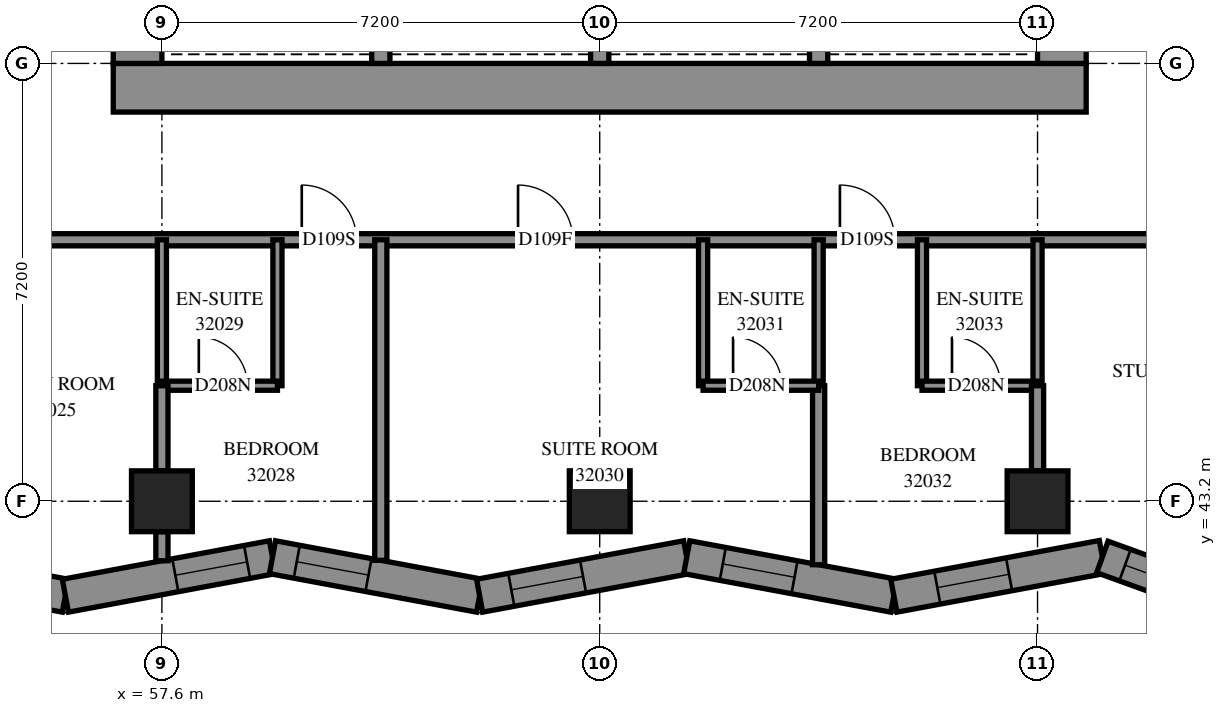
"""IFC4 building model, lengths in metres.
Left out: names, types, materials, properties, quantities, classifications, styles, units other than length and angle.
Written with IfcOpenShell. Run it as: python <this file> out.ifc"""

import sys

from ifc_helpers import new_model, si_unit, direction, frame, frame_2d, origin, origin_2d, place, context, subcontext, project, spatial, polyline, rectangle, outline, extrude, element, fill, save


model = new_model("IFC4")
c1 = context("Model", 3, precision=1e-05, world=origin(), true_north=direction((0.0, 1.0)))
c2 = subcontext(c1, "Body", "Model", "MODEL_VIEW")
j1 = project(units=[si_unit("LENGTHUNIT", "METRE"), si_unit("PLANEANGLEUNIT", "RADIAN")], contexts=[c1])
p1 = place(None, origin())
s1 = spatial("IfcSite", under=j1, at=p1, CompositionType="ELEMENT")
p2 = place(p1, origin())
s2 = spatial("IfcBuilding", under=s1, at=p2, CompositionType="ELEMENT")
p3 = place(p2, frame((0.0, 0.0, 118.6)))
s3 = spatial("IfcBuildingStorey", under=s2, at=p3, CompositionType="ELEMENT", Elevation=118.6)
for number, where, z_axis, x_axis in (
    (1, (57.6, 43.2, 0.0), (0.0, 0.0, 1.0), (1.0, 0.0, 0.0)),
    (2, (64.8, 43.2, 0.0), (0.0, 0.0, 1.0), (1.0, 0.0, 0.0)),
    (3, (72.0, 43.2, 0.0), (0.0, 0.0, 1.0), (1.0, 0.0, 0.0)),
):
    element("IfcColumn", number, at=place(p3, frame(where, z_axis=z_axis, x_axis=x_axis)), inside=s3, PredefinedType="COLUMN", context=c2, shape_type="SweptSolid", body=[
        extrude(rectangle(XDim=1.0, YDim=1.0, at=origin_2d()), origin(), (0.0, 0.0, 1.0), 3.1),
    ])
p4 = place(p3, frame((56.8, 50.0, -0.3), z_axis=(0.0, 0.0, 1.0), x_axis=(1.0, 0.0, 0.0)))
e4 = element("IfcWall", 4, at=p4, inside=s3, PredefinedType="SHEAR", context=c2, shape_type="SweptSolid", body=[
    extrude(rectangle(XDim=16.0, YDim=0.8, at=frame_2d((8.0, 0.0))), origin(), (0.0, 0.0, 1.0), 2.7),
])
p5 = place(p3, frame((57.2, 50.4, -0.3), z_axis=(0.0, 0.0, 1.0), x_axis=(0.0, 1.0, 0.0)))
e5 = element("IfcWall", 5, at=p5, inside=s3, PredefinedType="SHEAR", context=c2, shape_type="SweptSolid", body=[
    extrude(rectangle(XDim=14.4, YDim=0.8, at=frame_2d((7.2, 0.0))), origin(), (0.0, 0.0, 1.0), 2.7),
])
p6 = place(p5, frame((4.55, 0.0, 0.3)))
e6 = element("IfcOpeningElement", 6, at=p6, cuts=e5, PredefinedType="OPENING", context=c2, shape_type="SweptSolid", body=[
    extrude(rectangle(XDim=1.1, YDim=2.1, at=frame_2d((0.55, 1.05))), frame((0.0, 0.41, 0.0), z_axis=(0.0, -1.0, 0.0), x_axis=(1.0, 0.0, 0.0)), (0.0, 0.0, 1.0), 0.82),
])
p7 = place(p5, frame((11.35, 0.0, 0.3)))
e7 = element("IfcOpeningElement", 7, at=p7, cuts=e5, PredefinedType="OPENING", context=c2, shape_type="SweptSolid", body=[
    extrude(rectangle(XDim=1.1, YDim=2.1, at=frame_2d((0.55, 1.05))), frame((0.0, 0.41, 0.0), z_axis=(0.0, -1.0, 0.0), x_axis=(1.0, 0.0, 0.0)), (0.0, 0.0, 1.0), 0.82),
])
p8 = place(p3, frame((72.4, 50.4, -0.3), z_axis=(0.0, 0.0, 1.0), x_axis=(0.0, 1.0, 0.0)))
e8 = element("IfcWall", 8, at=p8, inside=s3, PredefinedType="SHEAR", context=c2, shape_type="SweptSolid", body=[
    extrude(rectangle(XDim=14.4, YDim=0.8, at=frame_2d((7.2, 0.0))), origin(), (0.0, 0.0, 1.0), 2.7),
])
p9 = place(p8, frame((4.55, 0.0, 0.3)))
e9 = element("IfcOpeningElement", 9, at=p9, cuts=e8, PredefinedType="OPENING", context=c2, shape_type="SweptSolid", body=[
    extrude(rectangle(XDim=1.1, YDim=2.1, at=frame_2d((0.55, 1.05))), frame((0.0, 0.41, 0.0), z_axis=(0.0, -1.0, 0.0), x_axis=(1.0, 0.0, 0.0)), (0.0, 0.0, 1.0), 0.82),
])
p10 = place(p8, frame((11.35, 0.0, 0.3)))
e10 = element("IfcOpeningElement", 10, at=p10, cuts=e8, PredefinedType="OPENING", context=c2, shape_type="SweptSolid", body=[
    extrude(rectangle(XDim=1.1, YDim=2.1, at=frame_2d((0.55, 1.05))), frame((0.0, 0.41, 0.0), z_axis=(0.0, -1.0, 0.0), x_axis=(1.0, 0.0, 0.0)), (0.0, 0.0, 1.0), 0.82),
])
for number, where, z_axis, x_axis in (
    (11, (61.2, 50.4, 0.0), (0.0, 0.0, 1.0), (0.0, 1.0, 0.0)),
    (12, (64.8, 50.4, 0.0), (0.0, 0.0, 1.0), (0.0, 1.0, 0.0)),
    (13, (68.4, 50.4, 0.0), (0.0, 0.0, 1.0), (0.0, 1.0, 0.0)),
):
    element("IfcWall", number, at=place(p3, frame(where, z_axis=z_axis, x_axis=x_axis)), inside=s3, PredefinedType="SOLIDWALL", context=c2, shape_type="SweptSolid", body=[
        extrude(rectangle(XDim=3.3, YDim=0.3, at=frame_2d((1.65, 0.0))), origin(), (0.0, 0.0, 1.0), 3.1),
    ])
p11 = place(p3, frame((52.583, 42.284, 0.0), z_axis=(0.0, 0.0, 1.0), x_axis=(0.9831685115, -0.1827010621, 0.0)))
e14 = element("IfcWall", 14, at=p11, inside=s3, PredefinedType="SOLIDWALL", context=c2, shape_type="SweptSolid", body=[
    extrude(outline(polyline([(0.075, -0.275), (3.539, -0.275), (3.437, 0.275), (-0.075, 0.275), (0.075, -0.275)])), origin(), (0.0, 0.0, 1.0), 3.1),
])
p12 = place(p11, frame((1.739, 0.0, 0.5)))
e15 = element("IfcOpeningElement", 15, at=p12, cuts=e14, PredefinedType="OPENING", context=c2, shape_type="SweptSolid", body=[
    extrude(rectangle(XDim=1.2, YDim=2.45, at=frame_2d((0.6, 1.225))), frame((0.0, 0.285, 0.0), z_axis=(0.0, -1.0, 0.0), x_axis=(1.0, 0.0, 0.0)), (0.0, 0.0, 1.0), 0.57),
])
p13 = place(p3, frame((56.012, 41.647, 0.0), z_axis=(0.0, 0.0, 1.0), x_axis=(0.9831660022, 0.1827145649, 0.0)))
e16 = element("IfcWall", 16, at=p13, inside=s3, PredefinedType="SOLIDWALL", context=c2, shape_type="SweptSolid", body=[
    extrude(outline(polyline([(-0.051, -0.275), (3.413, -0.275), (3.516, 0.275), (0.051, 0.275), (-0.051, -0.275)])), origin(), (0.0, 0.0, 1.0), 3.1),
])
p14 = place(p13, frame((1.84, 0.0, 0.5)))
e17 = element("IfcOpeningElement", 17, at=p14, cuts=e16, PredefinedType="OPENING", context=c2, shape_type="SweptSolid", body=[
    extrude(rectangle(XDim=1.2, YDim=2.45, at=frame_2d((0.6, 1.225))), frame((0.0, 0.285, 0.0), z_axis=(0.0, -1.0, 0.0), x_axis=(1.0, 0.0, 0.0)), (0.0, 0.0, 1.0), 0.57),
])
p15 = place(p3, frame((59.419, 42.28, 0.0), z_axis=(0.0, 0.0, 1.0), x_axis=(0.9831669658, -0.1827093798, 0.0)))
e18 = element("IfcWall", 18, at=p15, inside=s3, PredefinedType="SOLIDWALL", context=c2, shape_type="SweptSolid", body=[
    extrude(outline(polyline([(0.051, -0.275), (3.516, -0.275), (3.413, 0.275), (-0.051, 0.275), (0.051, -0.275)])), origin(), (0.0, 0.0, 1.0), 3.1),
])
p16 = place(p15, frame((0.406, 0.0, 0.5)))
e19 = element("IfcOpeningElement", 19, at=p16, cuts=e18, PredefinedType="OPENING", context=c2, shape_type="SweptSolid", body=[
    extrude(rectangle(XDim=1.2, YDim=2.45, at=frame_2d((0.6, 1.225))), frame((0.0, 0.285, 0.0), z_axis=(0.0, -1.0, 0.0), x_axis=(1.0, 0.0, 0.0)), (0.0, 0.0, 1.0), 0.57),
])
p17 = place(p3, frame((62.825, 41.647, 0.0), z_axis=(0.0, 0.0, 1.0), x_axis=(0.9831669658, 0.1827093798, 0.0)))
e20 = element("IfcWall", 20, at=p17, inside=s3, PredefinedType="SOLIDWALL", context=c2, shape_type="SweptSolid", body=[
    extrude(outline(polyline([(-0.051, -0.275), (3.413, -0.275), (3.516, 0.275), (0.051, 0.275), (-0.051, -0.275)])), origin(), (0.0, 0.0, 1.0), 3.1),
])
p18 = place(p17, frame((0.53, 0.0, 0.5)))
e21 = element("IfcOpeningElement", 21, at=p18, cuts=e20, PredefinedType="OPENING", context=c2, shape_type="SweptSolid", body=[
    extrude(rectangle(XDim=1.2, YDim=2.45, at=frame_2d((0.6, 1.225))), frame((0.0, 0.285, 0.0), z_axis=(0.0, -1.0, 0.0), x_axis=(1.0, 0.0, 0.0)), (0.0, 0.0, 1.0), 0.57),
])
p19 = place(p3, frame((66.231, 42.28, 0.0), z_axis=(0.0, 0.0, 1.0), x_axis=(0.9831669658, -0.1827093798, 0.0)))
e22 = element("IfcWall", 22, at=p19, inside=s3, PredefinedType="SOLIDWALL", context=c2, shape_type="SweptSolid", body=[
    extrude(outline(polyline([(0.051, -0.275), (3.516, -0.275), (3.413, 0.275), (-0.051, 0.275), (0.051, -0.275)])), origin(), (0.0, 0.0, 1.0), 3.1),
])
p20 = place(p19, frame((0.603, 0.0, 0.5)))
e23 = element("IfcOpeningElement", 23, at=p20, cuts=e22, PredefinedType="OPENING", context=c2, shape_type="SweptSolid", body=[
    extrude(rectangle(XDim=1.2, YDim=2.45, at=frame_2d((0.6, 1.225))), frame((0.0, 0.285, 0.0), z_axis=(0.0, -1.0, 0.0), x_axis=(1.0, 0.0, 0.0)), (0.0, 0.0, 1.0), 0.57),
])
p21 = place(p3, frame((69.637, 41.647, 0.0), z_axis=(0.0, 0.0, 1.0), x_axis=(0.9831675545, 0.1827062117, 0.0)))
e24 = element("IfcWall", 24, at=p21, inside=s3, PredefinedType="SOLIDWALL", context=c2, shape_type="SweptSolid", body=[
    extrude(outline(polyline([(-0.051, -0.275), (3.413, -0.275), (3.563, 0.275), (0.051, 0.275), (-0.051, -0.275)])), origin(), (0.0, 0.0, 1.0), 3.1),
])
p22 = place(p21, frame((0.727, 0.0, 0.5)))
e25 = element("IfcOpeningElement", 25, at=p22, cuts=e24, PredefinedType="OPENING", context=c2, shape_type="SweptSolid", body=[
    extrude(rectangle(XDim=1.2, YDim=2.45, at=frame_2d((0.6, 1.225))), frame((0.0, 0.285, 0.0), z_axis=(0.0, -1.0, 0.0), x_axis=(1.0, 0.0, 0.0)), (0.0, 0.0, 1.0), 0.57),
])
p23 = place(p3, frame((73.067, 42.284, 0.0), z_axis=(0.0, 0.0, 1.0), x_axis=(0.9402976308, -0.3403532953, 0.0)))
e26 = element("IfcWall", 26, at=p23, inside=s3, PredefinedType="SOLIDWALL", context=c2, shape_type="SweptSolid", body=[
    extrude(outline(polyline([(0.075, -0.275), (3.697, -0.275), (3.734, 0.275), (-0.075, 0.275), (0.075, -0.275)])), origin(), (0.0, 0.0, 1.0), 3.1),
])
p24 = place(p23, frame((0.396, 0.0, 0.45)))
e27 = element("IfcOpeningElement", 27, at=p24, cuts=e26, PredefinedType="OPENING", context=c2, shape_type="SweptSolid", body=[
    extrude(rectangle(XDim=1.0, YDim=2.5, at=frame_2d((0.5, 1.25))), frame((0.0, 0.285, 0.0), z_axis=(0.0, -1.0, 0.0), x_axis=(1.0, 0.0, 0.0)), (0.0, 0.0, 1.0), 0.57),
])
p25 = place(p23, frame((2.003, 0.0, 0.5)))
e28 = element("IfcOpeningElement", 28, at=p25, cuts=e26, PredefinedType="OPENING", context=c2, shape_type="SweptSolid", body=[
    extrude(rectangle(XDim=1.2, YDim=2.45, at=frame_2d((0.6, 1.225))), frame((0.0, 0.285, 0.0), z_axis=(0.0, -1.0, 0.0), x_axis=(1.0, 0.0, 0.0)), (0.0, 0.0, 1.0), 0.57),
])
p26 = place(p3, frame((54.7, 47.5, 0.0), z_axis=(0.0, 0.0, 1.0), x_axis=(1.0, 0.0, 0.0)))
e29 = element("IfcWall", 29, at=p26, inside=s3, PredefinedType="PARTITIONING", context=c2, shape_type="SweptSolid", body=[
    extrude(rectangle(XDim=19.442, YDim=0.2, at=frame_2d((9.721, 0.0))), origin(), (0.0, 0.0, 1.0), 3.1),
])
p27 = place(p26, frame((5.2, 0.0, 0.0)))
e30 = element("IfcOpeningElement", 30, at=p27, cuts=e29, PredefinedType="OPENING", context=c2, shape_type="SweptSolid", body=[
    extrude(rectangle(XDim=0.9, YDim=2.1, at=frame_2d((0.45, 1.05))), frame((0.0, 0.11, 0.0), z_axis=(0.0, -1.0, 0.0), x_axis=(1.0, 0.0, 0.0)), (0.0, 0.0, 1.0), 0.22),
])
p28 = place(p26, frame((8.757, 0.0, 0.0)))
e31 = element("IfcOpeningElement", 31, at=p28, cuts=e29, PredefinedType="OPENING", context=c2, shape_type="SweptSolid", body=[
    extrude(rectangle(XDim=0.9, YDim=2.1, at=frame_2d((0.45, 1.05))), frame((0.0, 0.11, 0.0), z_axis=(0.0, -1.0, 0.0), x_axis=(1.0, 0.0, 0.0)), (0.0, 0.0, 1.0), 0.22),
])
p29 = place(p26, frame((14.05, 0.0, 0.0)))
e32 = element("IfcOpeningElement", 32, at=p29, cuts=e29, PredefinedType="OPENING", context=c2, shape_type="SweptSolid", body=[
    extrude(rectangle(XDim=0.9, YDim=2.1, at=frame_2d((0.45, 1.05))), frame((0.0, 0.11, 0.0), z_axis=(0.0, -1.0, 0.0), x_axis=(1.0, 0.0, 0.0)), (0.0, 0.0, 1.0), 0.22),
])
p30 = place(p3, frame((61.2, 42.228, 0.0), z_axis=(0.0, 0.0, 1.0), x_axis=(0.0, 1.0, 0.0)))
e33 = element("IfcWall", 33, at=p30, inside=s3, PredefinedType="PARTITIONING", context=c2, shape_type="SweptSolid", body=[
    extrude(rectangle(XDim=5.272, YDim=0.2, at=frame_2d((2.636, 0.0))), origin(), (0.0, 0.0, 1.0), 3.1),
])
p31 = place(p3, frame((68.4, 42.156, 0.0), z_axis=(0.0, 0.0, 1.0), x_axis=(0.0, 1.0, 0.0)))
e34 = element("IfcWall", 34, at=p31, inside=s3, PredefinedType="PARTITIONING", context=c2, shape_type="SweptSolid", body=[
    extrude(rectangle(XDim=2.944, YDim=0.2, at=frame_2d((1.472, 0.0))), origin(), (0.0, 0.0, 1.0), 3.1),
])
for number, where, z_axis, x_axis in (
    (35, (59.5, 45.1, 0.0), (0.0, 0.0, 1.0), (0.0, 1.0, 0.0)),
    (36, (57.6, 45.1, 0.0), (0.0, 0.0, 1.0), (0.0, 1.0, 0.0)),
    (37, (66.5, 45.1, 0.0), (0.0, 0.0, 1.0), (0.0, 1.0, 0.0)),
    (38, (68.4, 45.1, 0.0), (0.0, 0.0, 1.0), (0.0, 1.0, 0.0)),
    (39, (70.1, 45.1, 0.0), (0.0, 0.0, 1.0), (0.0, 1.0, 0.0)),
    (40, (72.0, 45.1, 0.0), (0.0, 0.0, 1.0), (0.0, 1.0, 0.0)),
):
    element("IfcWall", number, at=place(p3, frame(where, z_axis=z_axis, x_axis=x_axis)), inside=s3, PredefinedType="PARTITIONING", context=c2, shape_type="SweptSolid", body=[
        extrude(rectangle(XDim=2.4, YDim=0.15, at=frame_2d((1.2, 0.0))), origin(), (0.0, 0.0, 1.0), 3.1),
    ])
p32 = place(p3, frame((66.5, 45.1, 0.0), z_axis=(0.0, 0.0, 1.0), x_axis=(1.0, 0.0, 0.0)))
e41 = element("IfcWall", 41, at=p32, inside=s3, PredefinedType="PARTITIONING", context=c2, shape_type="SweptSolid", body=[
    extrude(rectangle(XDim=1.9, YDim=0.15, at=frame_2d((0.95, 0.0))), origin(), (0.0, 0.0, 1.0), 3.1),
])
p33 = place(p32, frame((0.493, 0.0, 0.0)))
e42 = element("IfcOpeningElement", 42, at=p33, cuts=e41, PredefinedType="OPENING", context=c2, shape_type="SweptSolid", body=[
    extrude(rectangle(XDim=0.8, YDim=2.1, at=frame_2d((0.4, 1.05))), frame((0.0, 0.085, 0.0), z_axis=(0.0, -1.0, 0.0), x_axis=(1.0, 0.0, 0.0)), (0.0, 0.0, 1.0), 0.17),
])
p34 = place(p3, frame((70.1, 45.1, 0.0), z_axis=(0.0, 0.0, 1.0), x_axis=(1.0, 0.0, 0.0)))
e43 = element("IfcWall", 43, at=p34, inside=s3, PredefinedType="PARTITIONING", context=c2, shape_type="SweptSolid", body=[
    extrude(rectangle(XDim=1.9, YDim=0.15, at=frame_2d((0.95, 0.0))), origin(), (0.0, 0.0, 1.0), 3.1),
])
p35 = place(p34, frame((0.493, 0.0, 0.0)))
e44 = element("IfcOpeningElement", 44, at=p35, cuts=e43, PredefinedType="OPENING", context=c2, shape_type="SweptSolid", body=[
    extrude(rectangle(XDim=0.8, YDim=2.1, at=frame_2d((0.4, 1.05))), frame((0.0, 0.085, 0.0), z_axis=(0.0, -1.0, 0.0), x_axis=(1.0, 0.0, 0.0)), (0.0, 0.0, 1.0), 0.17),
])
p36 = place(p3, frame((57.6, 45.1, 0.0), z_axis=(0.0, 0.0, 1.0), x_axis=(1.0, 0.0, 0.0)))
e45 = element("IfcWall", 45, at=p36, inside=s3, PredefinedType="PARTITIONING", context=c2, shape_type="SweptSolid", body=[
    extrude(rectangle(XDim=1.9, YDim=0.15, at=frame_2d((0.95, 0.0))), origin(), (0.0, 0.0, 1.0), 3.1),
])
p37 = place(p36, frame((0.607, 0.0, 0.0)))
e46 = element("IfcOpeningElement", 46, at=p37, cuts=e45, PredefinedType="OPENING", context=c2, shape_type="SweptSolid", body=[
    extrude(rectangle(XDim=0.8, YDim=2.1, at=frame_2d((0.4, 1.05))), frame((0.0, 0.085, 0.0), z_axis=(0.0, -1.0, 0.0), x_axis=(1.0, 0.0, 0.0)), (0.0, 0.0, 1.0), 0.17),
])
for number, where, z_axis, x_axis in (
    (47, (57.6, 43.7, 0.0), (0.0, 0.0, 1.0), (0.0, 1.0, 0.0)),
    (48, (72.0, 43.7, 0.0), (0.0, 0.0, 1.0), (0.0, 1.0, 0.0)),
):
    element("IfcWall", number, at=place(p3, frame(where, z_axis=z_axis, x_axis=x_axis)), inside=s3, PredefinedType="PARTITIONING", context=c2, shape_type="SweptSolid", body=[
        extrude(rectangle(XDim=1.4, YDim=0.2, at=frame_2d((0.7, 0.0))), origin(), (0.0, 0.0, 1.0), 3.1),
    ])
p38 = place(p3, frame((57.6, 42.221, 0.0), z_axis=(0.0, 0.0, 1.0), x_axis=(0.0, 1.0, 0.0)))
e49 = element("IfcWall", 49, at=p38, inside=s3, PredefinedType="PARTITIONING", context=c2, shape_type="SweptSolid", body=[
    extrude(rectangle(XDim=0.478, YDim=0.2, at=frame_2d((0.239, 0.0))), origin(), (0.0, 0.0, 1.0), 3.1),
])
p39 = place(p14, origin())
e50 = element("IfcWindow", 50, at=p39, inside=s3, PartitioningType="SINGLE_PANEL", PredefinedType="WINDOW", context=c2, shape_type="SweptSolid", body=[
    extrude(rectangle(XDim=1.2, YDim=2.45, at=frame_2d((0.6, 1.225))), frame((0.0, 0.155, 0.0), z_axis=(0.0, -1.0, 0.0), x_axis=(1.0, 0.0, 0.0)), (0.0, 0.0, 1.0), 0.06),
])
fill(e17, e50)
p40 = place(p16, origin())
e51 = element("IfcWindow", 51, at=p40, inside=s3, PartitioningType="SINGLE_PANEL", PredefinedType="WINDOW", context=c2, shape_type="SweptSolid", body=[
    extrude(rectangle(XDim=1.2, YDim=2.45, at=frame_2d((0.6, 1.225))), frame((0.0, 0.155, 0.0), z_axis=(0.0, -1.0, 0.0), x_axis=(1.0, 0.0, 0.0)), (0.0, 0.0, 1.0), 0.06),
])
fill(e19, e51)
p41 = place(p18, origin())
e52 = element("IfcWindow", 52, at=p41, inside=s3, PartitioningType="SINGLE_PANEL", PredefinedType="WINDOW", context=c2, shape_type="SweptSolid", body=[
    extrude(rectangle(XDim=1.2, YDim=2.45, at=frame_2d((0.6, 1.225))), frame((0.0, 0.155, 0.0), z_axis=(0.0, -1.0, 0.0), x_axis=(1.0, 0.0, 0.0)), (0.0, 0.0, 1.0), 0.06),
])
fill(e21, e52)
p42 = place(p20, origin())
e53 = element("IfcWindow", 53, at=p42, inside=s3, PartitioningType="SINGLE_PANEL", PredefinedType="WINDOW", context=c2, shape_type="SweptSolid", body=[
    extrude(rectangle(XDim=1.2, YDim=2.45, at=frame_2d((0.6, 1.225))), frame((0.0, 0.155, 0.0), z_axis=(0.0, -1.0, 0.0), x_axis=(1.0, 0.0, 0.0)), (0.0, 0.0, 1.0), 0.06),
])
fill(e23, e53)
p43 = place(p22, origin())
e54 = element("IfcWindow", 54, at=p43, inside=s3, PartitioningType="SINGLE_PANEL", PredefinedType="WINDOW", context=c2, shape_type="SweptSolid", body=[
    extrude(rectangle(XDim=1.2, YDim=2.45, at=frame_2d((0.6, 1.225))), frame((0.0, 0.155, 0.0), z_axis=(0.0, -1.0, 0.0), x_axis=(1.0, 0.0, 0.0)), (0.0, 0.0, 1.0), 0.06),
])
fill(e25, e54)
p44 = place(p27, origin())
e55 = element("IfcDoor", 55, at=p44, inside=s3, OperationType="SINGLE_SWING_LEFT", PredefinedType="DOOR", context=c2, shape_type="SweptSolid", body=[
    extrude(rectangle(XDim=0.9, YDim=2.1, at=frame_2d((0.45, 1.05))), frame((0.0, 0.025, 0.0), z_axis=(0.0, -1.0, 0.0), x_axis=(1.0, 0.0, 0.0)), (0.0, 0.0, 1.0), 0.05),
])
fill(e30, e55)
p45 = place(p37, origin())
e56 = element("IfcDoor", 56, at=p45, inside=s3, OperationType="SINGLE_SWING_RIGHT", PredefinedType="DOOR", context=c2, shape_type="SweptSolid", body=[
    extrude(rectangle(XDim=0.8, YDim=2.1, at=frame_2d((0.4, 1.05))), frame((0.0, 0.025, 0.0), z_axis=(0.0, -1.0, 0.0), x_axis=(1.0, 0.0, 0.0)), (0.0, 0.0, 1.0), 0.05),
])
fill(e46, e56)
p46 = place(p28, origin())
e57 = element("IfcDoor", 57, at=p46, inside=s3, OperationType="SINGLE_SWING_RIGHT", PredefinedType="DOOR", context=c2, shape_type="SweptSolid", body=[
    extrude(rectangle(XDim=0.9, YDim=2.1, at=frame_2d((0.45, 1.05))), frame((0.0, 0.025, 0.0), z_axis=(0.0, -1.0, 0.0), x_axis=(1.0, 0.0, 0.0)), (0.0, 0.0, 1.0), 0.05),
])
fill(e31, e57)
p47 = place(p33, origin())
e58 = element("IfcDoor", 58, at=p47, inside=s3, OperationType="SINGLE_SWING_RIGHT", PredefinedType="DOOR", context=c2, shape_type="SweptSolid", body=[
    extrude(rectangle(XDim=0.8, YDim=2.1, at=frame_2d((0.4, 1.05))), frame((0.0, 0.025, 0.0), z_axis=(0.0, -1.0, 0.0), x_axis=(1.0, 0.0, 0.0)), (0.0, 0.0, 1.0), 0.05),
])
fill(e42, e58)
p48 = place(p29, origin())
e59 = element("IfcDoor", 59, at=p48, inside=s3, OperationType="SINGLE_SWING_RIGHT", PredefinedType="DOOR", context=c2, shape_type="SweptSolid", body=[
    extrude(rectangle(XDim=0.9, YDim=2.1, at=frame_2d((0.45, 1.05))), frame((0.0, 0.025, 0.0), z_axis=(0.0, -1.0, 0.0), x_axis=(1.0, 0.0, 0.0)), (0.0, 0.0, 1.0), 0.05),
])
fill(e32, e59)
p49 = place(p35, origin())
e60 = element("IfcDoor", 60, at=p49, inside=s3, OperationType="SINGLE_SWING_RIGHT", PredefinedType="DOOR", context=c2, shape_type="SweptSolid", body=[
    extrude(rectangle(XDim=0.8, YDim=2.1, at=frame_2d((0.4, 1.05))), frame((0.0, 0.025, 0.0), z_axis=(0.0, -1.0, 0.0), x_axis=(1.0, 0.0, 0.0)), (0.0, 0.0, 1.0), 0.05),
])
fill(e44, e60)
p50 = place(p24, origin())
e61 = element("IfcWindow", 61, at=p50, inside=s3, PartitioningType="SINGLE_PANEL", PredefinedType="WINDOW", context=c2, shape_type="SweptSolid", body=[
    extrude(rectangle(XDim=1.0, YDim=2.5, at=frame_2d((0.5, 1.25))), frame((0.0, 0.155, 0.0), z_axis=(0.0, -1.0, 0.0), x_axis=(1.0, 0.0, 0.0)), (0.0, 0.0, 1.0), 0.06),
])
fill(e27, e61)
save(model, sys.argv[1])
